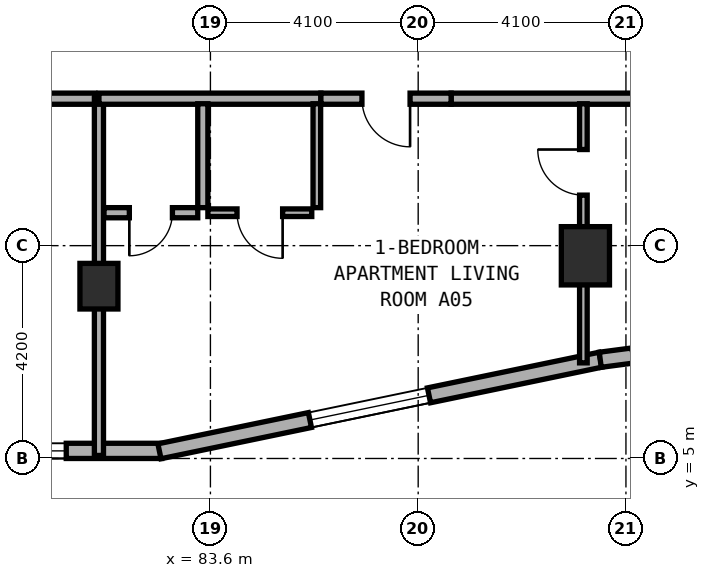
"""IFC4 building model, lengths in metres.
Left out: names, types, materials, properties, quantities, classifications, styles, units other than length and angle.
Written with IfcOpenShell. Run it as: python <this file> out.ifc"""

import sys

from ifc_helpers import new_model, si_unit, direction, frame, frame_2d, origin, origin_2d, place, context, subcontext, project, spatial, rectangle, extrude, element, fill, save


model = new_model("IFC4")
c1 = context("Model", 3, precision=1e-05, world=origin(), true_north=direction((0.0, 1.0)))
c2 = subcontext(c1, "Body", "Model", "MODEL_VIEW")
j1 = project(units=[si_unit("LENGTHUNIT", "METRE"), si_unit("PLANEANGLEUNIT", "RADIAN")], contexts=[c1])
p1 = place(None, origin())
s1 = spatial("IfcSite", under=j1, at=p1, CompositionType="ELEMENT")
p2 = place(p1, origin())
s2 = spatial("IfcBuilding", under=s1, at=p2, CompositionType="ELEMENT")
p3 = place(p2, frame((0.0, 0.0, 59.0)))
s3 = spatial("IfcBuildingStorey", under=s2, at=p3, CompositionType="ELEMENT", Elevation=59.0)
p4 = place(p3, frame((81.4, 8.4, 0.0), z_axis=(0.0, 0.0, 1.0), x_axis=(1.0, 0.0, 0.0)))
e1 = element("IfcColumn", 1, at=p4, inside=s3, PredefinedType="COLUMN", context=c2, shape_type="SweptSolid", body=[
    extrude(rectangle(XDim=0.75, YDim=0.9, at=origin_2d()), origin(), (0.0, 0.0, 1.0), 3.5),
])
p5 = place(p3, frame((91.0, 9.0, 0.0), z_axis=(0.0, 0.0, 1.0), x_axis=(1.0, 0.0, 0.0)))
e2 = element("IfcColumn", 2, at=p5, inside=s3, PredefinedType="COLUMN", context=c2, shape_type="SweptSolid", body=[
    extrude(rectangle(XDim=0.95, YDim=1.15, at=origin_2d()), origin(), (0.0, 0.0, 1.0), 3.5),
])
p6 = place(p3, frame((71.247, 5.15, 0.0), z_axis=(0.0, 0.0, 1.0), x_axis=(1.0, 0.0, 0.0)))
e3 = element("IfcWall", 3, at=p6, inside=s3, PredefinedType="STANDARD", context=c2, shape_type="SweptSolid", body=[
    extrude(rectangle(XDim=11.391, YDim=0.3, at=frame_2d((5.695, 0.0))), origin(), (0.0, 0.0, 1.0), 3.25),
])
p7 = place(p6, frame((5.113, 0.0, 0.0)))
e4 = element("IfcOpeningElement", 4, at=p7, cuts=e3, PredefinedType="OPENING", context=c2, shape_type="SweptSolid", body=[
    extrude(rectangle(XDim=1.2, YDim=2.15, at=frame_2d((0.6, 1.075))), frame((0.0, 0.16, 0.0), z_axis=(0.0, -1.0, 0.0), x_axis=(1.0, 0.0, 0.0)), (0.0, 0.0, 1.0), 0.32),
])
p8 = place(p6, frame((1.958, 0.0, 0.8)))
e5 = element("IfcOpeningElement", 5, at=p8, cuts=e3, PredefinedType="OPENING", context=c2, shape_type="SweptSolid", body=[
    extrude(rectangle(XDim=2.4, YDim=1.6, at=frame_2d((1.2, 0.8))), frame((0.0, 0.16, 0.0), z_axis=(0.0, -1.0, 0.0), x_axis=(1.0, 0.0, 0.0)), (0.0, 0.0, 1.0), 0.32),
])
p9 = place(p6, frame((7.108, 0.0, 0.8)))
e6 = element("IfcOpeningElement", 6, at=p9, cuts=e3, PredefinedType="OPENING", context=c2, shape_type="SweptSolid", body=[
    extrude(rectangle(XDim=2.4, YDim=1.6, at=frame_2d((1.2, 0.8))), frame((0.0, 0.16, 0.0), z_axis=(0.0, -1.0, 0.0), x_axis=(1.0, 0.0, 0.0)), (0.0, 0.0, 1.0), 0.32),
])
p10 = place(p3, frame((82.594, 5.142, 0.0), z_axis=(0.0, 0.0, 1.0), x_axis=(0.979125485139, 0.203256695712, 0.0)))
e7 = element("IfcWall", 7, at=p10, inside=s3, PredefinedType="STANDARD", context=c2, shape_type="SweptSolid", body=[
    extrude(rectangle(XDim=8.89, YDim=0.3, at=frame_2d((4.445, 0.0))), origin(), (0.0, 0.0, 1.0), 3.25),
])
p11 = place(p10, frame((3.033, 0.0, 0.8)))
e8 = element("IfcOpeningElement", 8, at=p11, cuts=e7, PredefinedType="OPENING", context=c2, shape_type="SweptSolid", body=[
    extrude(rectangle(XDim=2.4, YDim=1.6, at=frame_2d((1.2, 0.8))), frame((0.0, 0.16, 0.0), z_axis=(0.0, -1.0, 0.0), x_axis=(1.0, 0.0, 0.0)), (0.0, 0.0, 1.0), 0.32),
])
p12 = place(p3, frame((91.293, 6.948, 0.0), z_axis=(0.0, 0.0, 1.0), x_axis=(0.991486167159, 0.13021205909, 0.0)))
e9 = element("IfcWall", 9, at=p12, inside=s3, PredefinedType="STANDARD", context=c2, shape_type="SweptSolid", body=[
    extrude(rectangle(XDim=0.729, YDim=0.3, at=frame_2d((0.365, 0.0))), origin(), (0.0, 0.0, 1.0), 3.25),
])
p13 = place(p3, frame((76.98, 12.1, 0.0), z_axis=(0.0, 0.0, 1.0), x_axis=(1.0, 0.0, 0.0)))
e10 = element("IfcWall", 10, at=p13, inside=s3, PredefinedType="SOLIDWALL", context=c2, shape_type="SweptSolid", body=[
    extrude(rectangle(XDim=4.34, YDim=0.22, at=frame_2d((2.17, 0.0))), origin(), (0.0, 0.0, 1.0), 2.725),
])
p14 = place(p13, frame((1.695, 0.0, 0.0)))
e11 = element("IfcOpeningElement", 11, at=p14, cuts=e10, PredefinedType="OPENING", context=c2, shape_type="SweptSolid", body=[
    extrude(rectangle(XDim=0.95, YDim=2.1, at=frame_2d((0.475, 1.05))), frame((0.0, 0.12, 0.0), z_axis=(0.0, -1.0, 0.0), x_axis=(1.0, 0.0, 0.0)), (0.0, 0.0, 1.0), 0.24),
])
p15 = place(p3, frame((81.4, 5.06, 0.0), z_axis=(0.0, 0.0, 1.0), x_axis=(0.0, 1.0, 0.0)))
e12 = element("IfcWall", 12, at=p15, inside=s3, PredefinedType="SOLIDWALL", context=c2, shape_type="SweptSolid", body=[
    extrude(rectangle(XDim=7.04, YDim=0.18, at=frame_2d((3.52, 0.0))), origin(), (0.0, 0.0, 1.0), 2.725),
])
p16 = place(p3, frame((81.4, 12.1, 0.0), z_axis=(0.0, 0.0, 1.0), x_axis=(1.0, 0.0, 0.0)))
e13 = element("IfcWall", 13, at=p16, inside=s3, PredefinedType="SOLIDWALL", context=c2, shape_type="SweptSolid", body=[
    extrude(rectangle(XDim=4.38, YDim=0.22, at=frame_2d((2.19, 0.0))), origin(), (0.0, 0.0, 1.0), 2.725),
])
p17 = place(p3, frame((88.35, 12.1, 0.0), z_axis=(0.0, 0.0, 1.0), x_axis=(1.0, 0.0, 0.0)))
e14 = element("IfcWall", 14, at=p17, inside=s3, PredefinedType="SOLIDWALL", context=c2, shape_type="SweptSolid", body=[
    extrude(rectangle(XDim=7.41, YDim=0.22, at=frame_2d((3.705, 0.0))), origin(), (0.0, 0.0, 1.0), 2.865),
])
p18 = place(p3, frame((85.78, 12.1, 0.0), z_axis=(0.0, 0.0, 1.0), x_axis=(1.0, 0.0, 0.0)))
e15 = element("IfcWall", 15, at=p18, inside=s3, PredefinedType="SOLIDWALL", context=c2, shape_type="SweptSolid", body=[
    extrude(rectangle(XDim=2.57, YDim=0.22, at=frame_2d((1.285, 0.0))), origin(), (0.0, 0.0, 1.0), 3.22),
])
p19 = place(p18, frame((0.81, 0.0, 0.0)))
e16 = element("IfcOpeningElement", 16, at=p19, cuts=e15, PredefinedType="OPENING", context=c2, shape_type="SweptSolid", body=[
    extrude(rectangle(XDim=0.95, YDim=2.1, at=frame_2d((0.475, 1.05))), frame((0.0, 0.12, 0.0), z_axis=(0.0, -1.0, 0.0), x_axis=(1.0, 0.0, 0.0)), (0.0, 0.0, 1.0), 0.24),
])
p20 = place(p3, frame((90.96, 6.887, 0.0), z_axis=(0.0, 0.0, 1.0), x_axis=(0.0, 1.0, 0.0)))
e17 = element("IfcWall", 17, at=p20, inside=s3, PredefinedType="PARTITIONING", context=c2, shape_type="SweptSolid", body=[
    extrude(rectangle(XDim=5.113, YDim=0.15, at=frame_2d((2.557, 0.0))), origin(), (0.0, 0.0, 1.0), 2.865),
])
p21 = place(p20, frame((3.31, 0.0, 0.0)))
e18 = element("IfcOpeningElement", 18, at=p21, cuts=e17, PredefinedType="OPENING", context=c2, shape_type="SweptSolid", body=[
    extrude(rectangle(XDim=0.9, YDim=2.1, at=frame_2d((0.45, 1.05))), frame((0.0, 0.085, 0.0), z_axis=(0.0, -1.0, 0.0), x_axis=(1.0, 0.0, 0.0)), (0.0, 0.0, 1.0), 0.17),
])
p22 = place(p3, frame((83.45, 9.95, 0.0), z_axis=(0.0, 0.0, 1.0), x_axis=(0.0, 1.0, 0.0)))
e19 = element("IfcWall", 19, at=p22, inside=s3, PredefinedType="PLUMBINGWALL", context=c2, shape_type="SweptSolid", body=[
    extrude(rectangle(XDim=2.05, YDim=0.2, at=frame_2d((1.025, 0.0))), origin(), (0.0, 0.0, 1.0), 3.22),
])
p23 = place(p3, frame((85.7, 9.95, 0.0), z_axis=(0.0, 0.0, 1.0), x_axis=(0.0, 1.0, 0.0)))
e20 = element("IfcWall", 20, at=p23, inside=s3, PredefinedType="PARTITIONING", context=c2, shape_type="SweptSolid", body=[
    extrude(rectangle(XDim=2.05, YDim=0.15, at=frame_2d((1.025, 0.0))), origin(), (0.0, 0.0, 1.0), 3.22),
])
p24 = place(p3, frame((81.5, 9.85, 0.0), z_axis=(0.0, 0.0, 1.0), x_axis=(1.0, 0.0, 0.0)))
e21 = element("IfcWall", 21, at=p24, inside=s3, PredefinedType="PLUMBINGWALL", context=c2, shape_type="SweptSolid", body=[
    extrude(rectangle(XDim=1.85, YDim=0.2, at=frame_2d((0.925, 0.0))), origin(), (0.0, 0.0, 1.0), 2.725),
])
p25 = place(p24, frame((0.5, 0.0, 0.0)))
e22 = element("IfcOpeningElement", 22, at=p25, cuts=e21, PredefinedType="OPENING", context=c2, shape_type="SweptSolid", body=[
    extrude(rectangle(XDim=0.85, YDim=2.1, at=frame_2d((0.425, 1.05))), frame((0.0, 0.11, 0.0), z_axis=(0.0, -1.0, 0.0), x_axis=(1.0, 0.0, 0.0)), (0.0, 0.0, 1.0), 0.22),
])
p26 = place(p3, frame((83.55, 9.85, 0.0), z_axis=(0.0, 0.0, 1.0), x_axis=(1.0, 0.0, 0.0)))
e23 = element("IfcWall", 23, at=p26, inside=s3, PredefinedType="PARTITIONING", context=c2, shape_type="SweptSolid", body=[
    extrude(rectangle(XDim=2.05, YDim=0.15, at=frame_2d((1.025, 0.0))), origin(), (0.0, 0.0, 1.0), 3.22),
])
p27 = place(p26, frame((0.575, 0.0, 0.0)))
e24 = element("IfcOpeningElement", 24, at=p27, cuts=e23, PredefinedType="OPENING", context=c2, shape_type="SweptSolid", body=[
    extrude(rectangle(XDim=0.9, YDim=2.1, at=frame_2d((0.45, 1.05))), frame((0.0, 0.085, 0.0), z_axis=(0.0, -1.0, 0.0), x_axis=(1.0, 0.0, 0.0)), (0.0, 0.0, 1.0), 0.17),
])
p28 = place(p9, origin())
e25 = element("IfcWindow", 25, at=p28, inside=s3, PartitioningType="SINGLE_PANEL", PredefinedType="WINDOW", context=c2, shape_type="SweptSolid", body=[
    extrude(rectangle(XDim=2.4, YDim=1.6, at=frame_2d((1.2, 0.8))), frame((0.0, 0.03, 0.0), z_axis=(0.0, -1.0, 0.0), x_axis=(1.0, 0.0, 0.0)), (0.0, 0.0, 1.0), 0.06),
])
fill(e6, e25)
p29 = place(p11, origin())
e26 = element("IfcWindow", 26, at=p29, inside=s3, PartitioningType="SINGLE_PANEL", PredefinedType="WINDOW", context=c2, shape_type="SweptSolid", body=[
    extrude(rectangle(XDim=2.4, YDim=1.6, at=frame_2d((1.2, 0.8))), frame((0.0, 0.03, 0.0), z_axis=(0.0, -1.0, 0.0), x_axis=(1.0, 0.0, 0.0)), (0.0, 0.0, 1.0), 0.06),
])
fill(e8, e26)
p30 = place(p19, frame((0.95, 0.0, 0.0), z_axis=(0.0, 0.0, 1.0), x_axis=(-1.0, 0.0, 0.0)))
e27 = element("IfcDoor", 27, at=p30, inside=s3, OperationType="SINGLE_SWING_LEFT", PredefinedType="DOOR", context=c2, shape_type="SweptSolid", body=[
    extrude(rectangle(XDim=0.95, YDim=2.1, at=frame_2d((0.475, 1.05))), frame((0.0, 0.025, 0.0), z_axis=(0.0, -1.0, 0.0), x_axis=(1.0, 0.0, 0.0)), (0.0, 0.0, 1.0), 0.05),
])
fill(e16, e27)
p31 = place(p21, origin())
e28 = element("IfcDoor", 28, at=p31, inside=s3, OperationType="SINGLE_SWING_RIGHT", PredefinedType="DOOR", context=c2, shape_type="SweptSolid", body=[
    extrude(rectangle(XDim=0.9, YDim=2.1, at=frame_2d((0.45, 1.05))), frame((0.0, 0.025, 0.0), z_axis=(0.0, -1.0, 0.0), x_axis=(1.0, 0.0, 0.0)), (0.0, 0.0, 1.0), 0.05),
])
fill(e18, e28)
p32 = place(p25, frame((0.85, 0.0, 0.0), z_axis=(0.0, 0.0, 1.0), x_axis=(-1.0, 0.0, 0.0)))
e29 = element("IfcDoor", 29, at=p32, inside=s3, OperationType="SINGLE_SWING_RIGHT", PredefinedType="DOOR", context=c2, shape_type="SweptSolid", body=[
    extrude(rectangle(XDim=0.85, YDim=2.1, at=frame_2d((0.425, 1.05))), frame((0.0, 0.025, 0.0), z_axis=(0.0, -1.0, 0.0), x_axis=(1.0, 0.0, 0.0)), (0.0, 0.0, 1.0), 0.05),
])
fill(e22, e29)
p33 = place(p27, frame((0.9, 0.0, 0.0), z_axis=(0.0, 0.0, 1.0), x_axis=(-1.0, 0.0, 0.0)))
e30 = element("IfcDoor", 30, at=p33, inside=s3, OperationType="SINGLE_SWING_LEFT", PredefinedType="DOOR", context=c2, shape_type="SweptSolid", body=[
    extrude(rectangle(XDim=0.9, YDim=2.1, at=frame_2d((0.45, 1.05))), frame((0.0, 0.025, 0.0), z_axis=(0.0, -1.0, 0.0), x_axis=(1.0, 0.0, 0.0)), (0.0, 0.0, 1.0), 0.05),
])
fill(e24, e30)
save(model, sys.argv[1])
